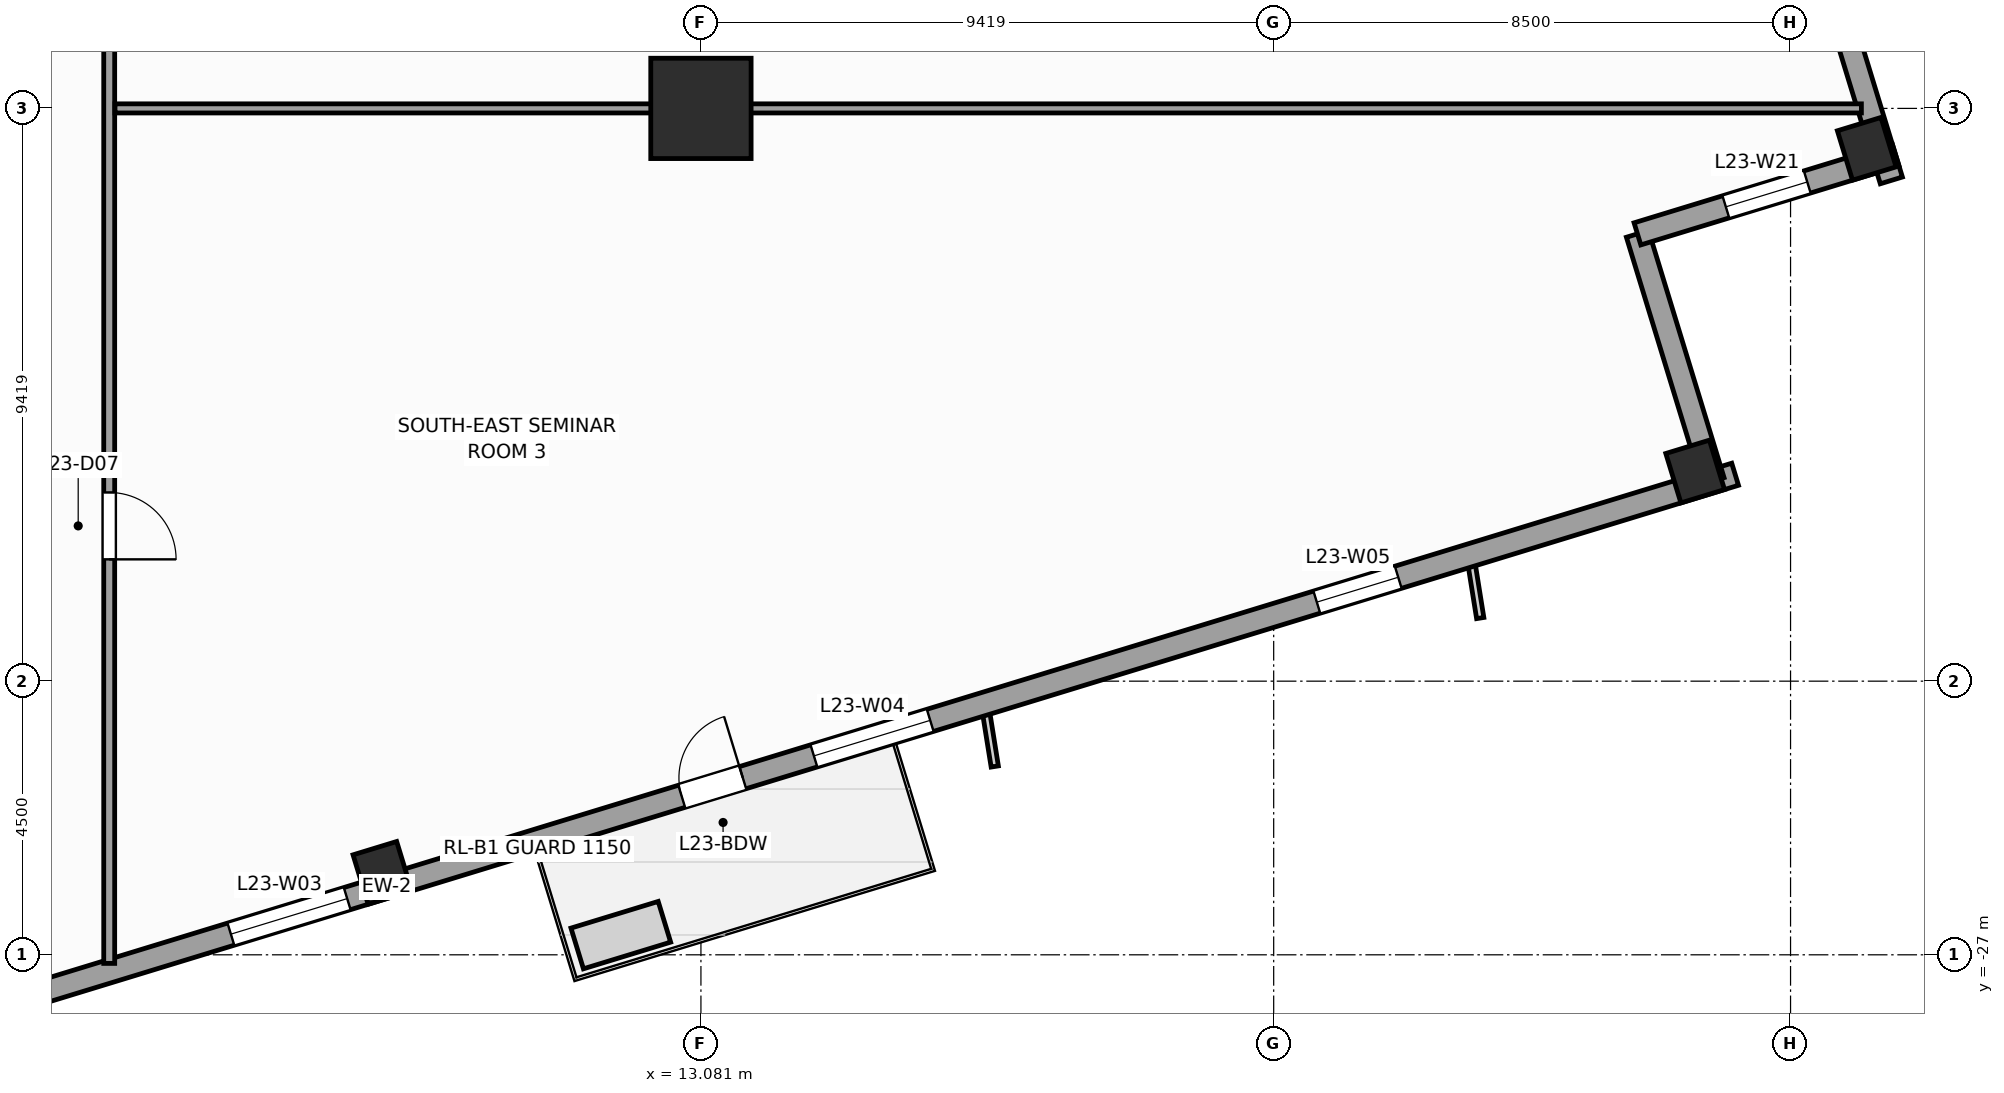
"""IFC4 building model, lengths in metres.
Left out: names, types, materials, properties, quantities, classifications, styles, units other than length and angle.
Written with IfcOpenShell. Run it as: python <this file> out.ifc"""

import sys

from ifc_helpers import new_model, si_unit, direction, frame, frame_2d, origin, origin_2d, place, context, subcontext, project, spatial, rectangle, extrude, source, transform, mapped, element, fill, save


model = new_model("IFC4")
c1 = context("Model", 3, precision=1e-05, world=origin(), true_north=direction((0.0, 1.0)))
c2 = subcontext(c1, "Body", "Model", "MODEL_VIEW")
j1 = project(units=[si_unit("LENGTHUNIT", "METRE"), si_unit("PLANEANGLEUNIT", "RADIAN")], contexts=[c1])
p1 = place(None, origin())
s1 = spatial("IfcSite", under=j1, at=p1, CompositionType="ELEMENT")
p2 = place(p1, origin())
s2 = spatial("IfcBuilding", under=s1, at=p2, CompositionType="ELEMENT")
p3 = place(p2, frame((0.0, 0.0, 99.2)))
s3 = spatial("IfcBuildingStorey", under=s2, at=p3, CompositionType="ELEMENT", Elevation=99.2)
m1 = source(origin(), c2, "Body", "SweptSolid", [
    extrude(rectangle(XDim=1.65, YDim=1.65, at=origin_2d()), origin(), (0.0, 0.0, 1.0), 4.0),
])
p4 = place(p3, frame((13.081, -13.081, 0.0), z_axis=(0.0, 0.0, 1.0), x_axis=(1.0, 0.0, 0.0)))
e1 = element("IfcColumn", 1, at=p4, inside=s3, PredefinedType="COLUMN", context=c2, shape_type="MappedRepresentation", body=[
    mapped(m1, transform((0.0, 0.0, 0.0), scale=1.0)),
])
m2 = source(origin(), c2, "Body", "SweptSolid", [
    extrude(rectangle(XDim=0.75, YDim=0.85, at=origin_2d()), origin(), (0.0, 0.0, 1.0), 4.0),
])
for number, where, z_axis, x_axis in (
    (2, (7.843, -25.653, 0.0), (0.0, 0.0, 1.0), (0.956, 0.292, 0.0)),
    (3, (29.431, -19.052, 0.0), (0.0, 0.0, 1.0), (0.956, 0.292, 0.0)),
    (4, (32.253, -13.746, 0.0), (0.0, 0.0, 1.0), (0.956, 0.292, 0.0)),
):
    element("IfcColumn", number, at=place(p3, frame(where, z_axis=z_axis, x_axis=x_axis)), inside=s3, PredefinedType="COLUMN", context=c2, shape_type="MappedRepresentation", body=[
        mapped(m2, transform((0.0, 0.0, 0.0), scale=1.0)),
    ])
p5 = place(p3, frame((-14.265, -32.658, 0.0), z_axis=(0.0, 0.0, 1.0), x_axis=(0.956304320851, 0.292373127906, 0.0)))
e5 = element("IfcWall", 5, at=p5, inside=s3, PredefinedType="STANDARD", context=c2, shape_type="SweptSolid", body=[
    extrude(rectangle(XDim=46.38, YDim=0.38, at=frame_2d((23.19, 0.0))), origin(), (0.0, 0.0, 1.0), 3.14),
])
p6 = place(p5, frame((28.265, 0.0, 0.0)))
e6 = element("IfcOpeningElement", 6, at=p6, cuts=e5, PredefinedType="OPENING", context=c2, shape_type="SweptSolid", body=[
    extrude(rectangle(XDim=1.05, YDim=2.25, at=frame_2d((0.525, 1.125))), frame((0.0, 0.2, 0.0), z_axis=(0.0, -1.0, 0.0), x_axis=(1.0, 0.0, 0.0)), (0.0, 0.0, 1.0), 0.4),
])
p7 = place(p5, frame((4.865, 0.0, 0.51)))
e7 = element("IfcOpeningElement", 7, at=p7, cuts=e5, PredefinedType="OPENING", context=c2, shape_type="SweptSolid", body=[
    extrude(rectangle(XDim=1.4, YDim=2.4, at=frame_2d((0.7, 1.2))), frame((0.0, 0.2, 0.0), z_axis=(0.0, -1.0, 0.0), x_axis=(1.0, 0.0, 0.0)), (0.0, 0.0, 1.0), 0.4),
])
p8 = place(p5, frame((12.45, 0.0, 0.51)))
e8 = element("IfcOpeningElement", 8, at=p8, cuts=e5, PredefinedType="OPENING", context=c2, shape_type="SweptSolid", body=[
    extrude(rectangle(XDim=2.0, YDim=2.4, at=frame_2d((1.0, 1.2))), frame((0.0, 0.2, 0.0), z_axis=(0.0, -1.0, 0.0), x_axis=(1.0, 0.0, 0.0)), (0.0, 0.0, 1.0), 0.4),
])
p9 = place(p5, frame((20.512, 0.0, 0.51)))
e9 = element("IfcOpeningElement", 9, at=p9, cuts=e5, PredefinedType="OPENING", context=c2, shape_type="SweptSolid", body=[
    extrude(rectangle(XDim=2.0, YDim=2.4, at=frame_2d((1.0, 1.2))), frame((0.0, 0.2, 0.0), z_axis=(0.0, -1.0, 0.0), x_axis=(1.0, 0.0, 0.0)), (0.0, 0.0, 1.0), 0.4),
])
p10 = place(p5, frame((30.538, 0.0, 0.51)))
e10 = element("IfcOpeningElement", 10, at=p10, cuts=e5, PredefinedType="OPENING", context=c2, shape_type="SweptSolid", body=[
    extrude(rectangle(XDim=2.0, YDim=2.4, at=frame_2d((1.0, 1.2))), frame((0.0, 0.2, 0.0), z_axis=(0.0, -1.0, 0.0), x_axis=(1.0, 0.0, 0.0)), (0.0, 0.0, 1.0), 0.4),
])
p11 = place(p5, frame((39.187, 0.0, 0.51)))
e11 = element("IfcOpeningElement", 11, at=p11, cuts=e5, PredefinedType="OPENING", context=c2, shape_type="SweptSolid", body=[
    extrude(rectangle(XDim=1.4, YDim=2.4, at=frame_2d((0.7, 1.2))), frame((0.0, 0.2, 0.0), z_axis=(0.0, -1.0, 0.0), x_axis=(1.0, 0.0, 0.0)), (0.0, 0.0, 1.0), 0.4),
])
p12 = place(p3, frame((29.725, -19.208, 0.0), z_axis=(0.0, 0.0, 1.0), x_axis=(-0.292345507338, 0.956312764915, 0.0)))
e12 = element("IfcWall", 12, at=p12, inside=s3, PredefinedType="STANDARD", context=c2, shape_type="SweptSolid", body=[
    extrude(rectangle(XDim=4.25, YDim=0.38, at=frame_2d((2.125, 0.0))), origin(), (0.0, 0.0, 1.0), 3.74),
])
p13 = place(p3, frame((28.482, -15.144, 0.0), z_axis=(0.0, 0.0, 1.0), x_axis=(0.956304176051, 0.292373601522, 0.0)))
e13 = element("IfcWall", 13, at=p13, inside=s3, PredefinedType="STANDARD", context=c2, shape_type="SweptSolid", body=[
    extrude(rectangle(XDim=4.44, YDim=0.38, at=frame_2d((2.22, 0.0))), origin(), (0.0, 0.0, 1.0), 3.04),
])
p14 = place(p13, frame((1.52, 0.0, 0.51)))
e14 = element("IfcOpeningElement", 14, at=p14, cuts=e13, PredefinedType="OPENING", context=c2, shape_type="SweptSolid", body=[
    extrude(rectangle(XDim=1.4, YDim=2.4, at=frame_2d((0.7, 1.2))), frame((0.0, 0.2, 0.0), z_axis=(0.0, -1.0, 0.0), x_axis=(1.0, 0.0, 0.0)), (0.0, 0.0, 1.0), 0.4),
])
p15 = place(p3, frame((32.658, -14.265, 0.0), z_axis=(0.0, 0.0, 1.0), x_axis=(-0.292373127906, 0.956304320851, 0.0)))
e15 = element("IfcWall", 15, at=p15, inside=s3, PredefinedType="STANDARD", context=c2, shape_type="SweptSolid", body=[
    extrude(rectangle(XDim=46.38, YDim=0.38, at=frame_2d((23.19, 0.0))), origin(), (0.0, 0.0, 1.0), 3.14),
])
p16 = place(p15, frame((4.865, 0.0, 0.51)))
e16 = element("IfcOpeningElement", 16, at=p16, cuts=e15, PredefinedType="OPENING", context=c2, shape_type="SweptSolid", body=[
    extrude(rectangle(XDim=1.4, YDim=2.4, at=frame_2d((0.7, 1.2))), frame((0.0, 0.2, 0.0), z_axis=(0.0, -1.0, 0.0), x_axis=(1.0, 0.0, 0.0)), (0.0, 0.0, 1.0), 0.4),
])
p17 = place(p15, frame((10.95, 0.0, 0.51)))
e17 = element("IfcOpeningElement", 17, at=p17, cuts=e15, PredefinedType="OPENING", context=c2, shape_type="SweptSolid", body=[
    extrude(rectangle(XDim=2.0, YDim=2.4, at=frame_2d((1.0, 1.2))), frame((0.0, 0.2, 0.0), z_axis=(0.0, -1.0, 0.0), x_axis=(1.0, 0.0, 0.0)), (0.0, 0.0, 1.0), 0.4),
])
p18 = place(p15, frame((20.512, 0.0, 0.51)))
e18 = element("IfcOpeningElement", 18, at=p18, cuts=e15, PredefinedType="OPENING", context=c2, shape_type="SweptSolid", body=[
    extrude(rectangle(XDim=2.0, YDim=2.4, at=frame_2d((1.0, 1.2))), frame((0.0, 0.2, 0.0), z_axis=(0.0, -1.0, 0.0), x_axis=(1.0, 0.0, 0.0)), (0.0, 0.0, 1.0), 0.4),
])
p19 = place(p15, frame((30.538, 0.0, 0.51)))
e19 = element("IfcOpeningElement", 19, at=p19, cuts=e15, PredefinedType="OPENING", context=c2, shape_type="SweptSolid", body=[
    extrude(rectangle(XDim=2.0, YDim=2.4, at=frame_2d((1.0, 1.2))), frame((0.0, 0.2, 0.0), z_axis=(0.0, -1.0, 0.0), x_axis=(1.0, 0.0, 0.0)), (0.0, 0.0, 1.0), 0.4),
])
p20 = place(p15, frame((39.187, 0.0, 0.51)))
e20 = element("IfcOpeningElement", 20, at=p20, cuts=e15, PredefinedType="OPENING", context=c2, shape_type="SweptSolid", body=[
    extrude(rectangle(XDim=1.4, YDim=2.4, at=frame_2d((0.7, 1.2))), frame((0.0, 0.2, 0.0), z_axis=(0.0, -1.0, 0.0), x_axis=(1.0, 0.0, 0.0)), (0.0, 0.0, 1.0), 0.4),
])
p21 = place(p3, frame((3.35, -27.142, 0.0), z_axis=(0.0, 0.0, 1.0), x_axis=(0.0, 1.0, 0.0)))
e21 = element("IfcWall", 21, at=p21, inside=s3, PredefinedType="PARTITIONING", context=c2, shape_type="SweptSolid", body=[
    extrude(rectangle(XDim=16.592, YDim=0.18, at=frame_2d((8.296, 0.0))), origin(), (0.0, 0.0, 1.0), 3.41),
])
p22 = place(p21, frame((6.645, 0.0, 0.0)))
e22 = element("IfcOpeningElement", 22, at=p22, cuts=e21, PredefinedType="OPENING", context=c2, shape_type="SweptSolid", body=[
    extrude(rectangle(XDim=1.1, YDim=2.2, at=frame_2d((0.55, 1.1))), frame((0.0, 0.1, 0.0), z_axis=(0.0, -1.0, 0.0), x_axis=(1.0, 0.0, 0.0)), (0.0, 0.0, 1.0), 0.2),
])
p23 = place(p3, frame((3.445, -13.081, 0.0), z_axis=(0.0, 0.0, 1.0), x_axis=(1.0, 0.0, 0.0)))
e23 = element("IfcWall", 23, at=p23, inside=s3, PredefinedType="PARTITIONING", context=c2, shape_type="SweptSolid", body=[
    extrude(rectangle(XDim=28.72, YDim=0.15, at=frame_2d((14.36, 0.0))), origin(), (0.0, 0.0, 1.0), 2.732),
])
m3 = source(origin(), c2, "Body", "SweptSolid", [
    extrude(rectangle(XDim=1.05, YDim=2.25, at=frame_2d((0.525, 1.125))), frame((0.0, 0.025, 0.0), z_axis=(0.0, -1.0, 0.0), x_axis=(1.0, 0.0, 0.0)), (0.0, 0.0, 1.0), 0.05),
])
p24 = place(p6, origin())
e24 = element("IfcDoor", 24, at=p24, inside=s3, OperationType="SINGLE_SWING_RIGHT", PredefinedType="DOOR", context=c2, shape_type="MappedRepresentation", body=[
    mapped(m3, transform((0.0, 0.0, 0.0), scale=1.0)),
])
fill(e6, e24)
m4 = source(origin(), c2, "Body", "SweptSolid", [
    extrude(rectangle(XDim=2.0, YDim=2.4, at=frame_2d((1.0, 1.2))), frame((0.0, 0.03, 0.0), z_axis=(0.0, -1.0, 0.0), x_axis=(1.0, 0.0, 0.0)), (0.0, 0.0, 1.0), 0.06),
])
p25 = place(p9, origin())
e25 = element("IfcWindow", 25, at=p25, inside=s3, PartitioningType="SINGLE_PANEL", PredefinedType="WINDOW", context=c2, shape_type="MappedRepresentation", body=[
    mapped(m4, transform((0.0, 0.0, 0.0), scale=1.0)),
])
fill(e9, e25)
p26 = place(p10, origin())
e26 = element("IfcWindow", 26, at=p26, inside=s3, PartitioningType="SINGLE_PANEL", PredefinedType="WINDOW", context=c2, shape_type="MappedRepresentation", body=[
    mapped(m4, transform((0.0, 0.0, 0.0), scale=1.0)),
])
fill(e10, e26)
m5 = source(origin(), c2, "Body", "SweptSolid", [
    extrude(rectangle(XDim=1.4, YDim=2.4, at=frame_2d((0.7, 1.2))), frame((0.0, 0.03, 0.0), z_axis=(0.0, -1.0, 0.0), x_axis=(1.0, 0.0, 0.0)), (0.0, 0.0, 1.0), 0.06),
])
p27 = place(p11, origin())
e27 = element("IfcWindow", 27, at=p27, inside=s3, PartitioningType="SINGLE_PANEL", PredefinedType="WINDOW", context=c2, shape_type="MappedRepresentation", body=[
    mapped(m5, transform((0.0, 0.0, 0.0), scale=1.0)),
])
fill(e11, e27)
p28 = place(p14, origin())
e28 = element("IfcWindow", 28, at=p28, inside=s3, PartitioningType="SINGLE_PANEL", PredefinedType="WINDOW", context=c2, shape_type="MappedRepresentation", body=[
    mapped(m5, transform((0.0, 0.0, 0.0), scale=1.0)),
])
fill(e14, e28)
m6 = source(origin(), c2, "Body", "SweptSolid", [
    extrude(rectangle(XDim=1.1, YDim=2.2, at=frame_2d((0.55, 1.1))), frame((0.0, 0.025, 0.0), z_axis=(0.0, -1.0, 0.0), x_axis=(1.0, 0.0, 0.0)), (0.0, 0.0, 1.0), 0.05),
])
p29 = place(p22, frame((1.1, 0.0, 0.0), z_axis=(0.0, 0.0, 1.0), x_axis=(-1.0, 0.0, 0.0)))
e29 = element("IfcDoor", 29, at=p29, inside=s3, OperationType="SINGLE_SWING_LEFT", PredefinedType="DOOR", context=c2, shape_type="MappedRepresentation", body=[
    mapped(m6, transform((0.0, 0.0, 0.0), scale=1.0)),
])
fill(e22, e29)
save(model, sys.argv[1])
